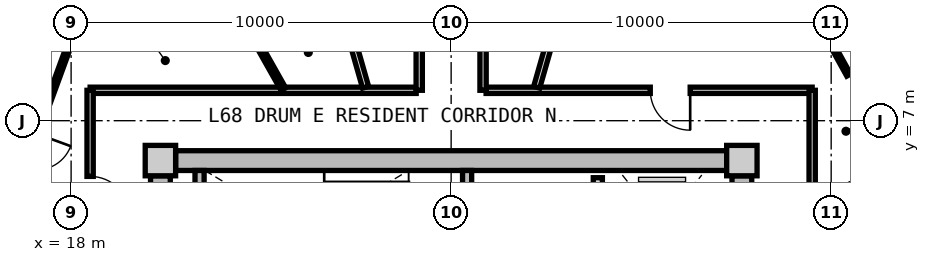
"""IFC4 building model, lengths in metres.
Left out: names, types, materials, properties, quantities, classifications, styles, units other than length and angle.
Written with IfcOpenShell. Run it as: python <this file> out.ifc"""

import sys

from ifc_helpers import new_model, si_unit, direction, frame, frame_2d, origin, origin_2d, place, context, subcontext, project, spatial, rectangle, extrude, source, transform, mapped, element, fill, save


model = new_model("IFC4")
c1 = context("Model", 3, precision=1e-05, world=origin(), true_north=direction((0.0, 1.0)))
c2 = subcontext(c1, "Body", "Model", "MODEL_VIEW")
j1 = project(units=[si_unit("LENGTHUNIT", "METRE"), si_unit("PLANEANGLEUNIT", "RADIAN")], contexts=[c1])
p1 = place(None, origin())
s1 = spatial("IfcSite", under=j1, at=p1, CompositionType="ELEMENT")
p2 = place(p1, origin())
s2 = spatial("IfcBuilding", under=s1, at=p2, CompositionType="ELEMENT")
p3 = place(p2, frame((0.0, 0.0, 220.0)))
s3 = spatial("IfcBuildingStorey", under=s2, at=p3, CompositionType="ELEMENT", Elevation=220.0)
m1 = source(origin(), c2, "Body", "SweptSolid", [
    extrude(rectangle(XDim=0.8, YDim=0.8, at=origin_2d()), origin(), (0.0, 0.0, 1.0), 3.05),
])
for number, where, z_axis, x_axis in (
    (1, (35.65, 5.95, 0.0), (0.0, 0.0, 1.0), (1.0, 0.0, 0.0)),
    (2, (20.35, 5.95, 0.0), (0.0, 0.0, 1.0), (1.0, 0.0, 0.0)),
):
    element("IfcColumn", number, at=place(p3, frame(where, z_axis=z_axis, x_axis=x_axis)), inside=s3, PredefinedType="COLUMN", context=c2, shape_type="MappedRepresentation", body=[
        mapped(m1, transform((0.0, 0.0, 0.0), x_axis=(1.0, 0.0, 0.0), y_axis=(0.0, 1.0, 0.0), z_axis=(0.0, 0.0, 1.0), scale=1.0)),
    ])
m2 = source(origin(), c2, "Body", "SweptSolid", [
    extrude(rectangle(XDim=14.5, YDim=0.52, at=frame_2d((7.25, 0.0))), origin(), (0.0, 0.0, 1.0), 2.76),
])
p4 = place(p3, frame((20.75, 5.95, 0.0), z_axis=(0.0, 0.0, 1.0), x_axis=(1.0, 0.0, 0.0)))
e3 = element("IfcWall", 3, at=p4, inside=s3, PredefinedType="SHEAR", context=c2, shape_type="MappedRepresentation", body=[
    mapped(m2, transform((0.0, 0.0, 0.0), x_axis=(1.0, 0.0, 0.0), y_axis=(0.0, 1.0, 0.0), z_axis=(0.0, 0.0, 1.0), scale=1.0)),
])
m3 = source(origin(), c2, "Body", "SweptSolid", [
    extrude(rectangle(XDim=11.1, YDim=0.52, at=frame_2d((5.55, 0.0))), origin(), (0.0, 0.0, 1.0), 2.76),
])
p5 = place(p3, frame((20.35, -5.55, 0.0), z_axis=(0.0, 0.0, 1.0), x_axis=(0.0, 1.0, 0.0)))
e4 = element("IfcWall", 4, at=p5, inside=s3, PredefinedType="SHEAR", context=c2, shape_type="MappedRepresentation", body=[
    mapped(m3, transform((0.0, 0.0, 0.0), x_axis=(1.0, 0.0, 0.0), y_axis=(0.0, 1.0, 0.0), z_axis=(0.0, 0.0, 1.0), scale=1.0)),
])
p6 = place(p5, frame((3.8, 0.0, 0.0)))
e5 = element("IfcOpeningElement", 5, at=p6, cuts=e4, PredefinedType="OPENING", context=c2, shape_type="SweptSolid", body=[
    extrude(rectangle(XDim=1.2, YDim=2.15, at=frame_2d((0.6, 1.075))), frame((0.0, 0.27, 0.0), z_axis=(0.0, -1.0, 0.0), x_axis=(1.0, 0.0, 0.0)), (0.0, 0.0, 1.0), 0.54),
])
p7 = place(p3, frame((35.65, 5.55, 0.0), z_axis=(0.0, 0.0, 1.0), x_axis=(0.0, -1.0, 0.0)))
e6 = element("IfcWall", 6, at=p7, inside=s3, PredefinedType="SHEAR", context=c2, shape_type="MappedRepresentation", body=[
    mapped(m3, transform((0.0, 0.0, 0.0), x_axis=(1.0, 0.0, 0.0), y_axis=(0.0, 1.0, 0.0), z_axis=(0.0, 0.0, 1.0), scale=1.0)),
])
p8 = place(p7, frame((5.65, 0.0, 0.0)))
e7 = element("IfcOpeningElement", 7, at=p8, cuts=e6, PredefinedType="OPENING", context=c2, shape_type="SweptSolid", body=[
    extrude(rectangle(XDim=1.2, YDim=2.15, at=frame_2d((0.6, 1.075))), frame((0.0, 0.27, 0.0), z_axis=(0.0, -1.0, 0.0), x_axis=(1.0, 0.0, 0.0)), (0.0, 0.0, 1.0), 0.54),
])
m4 = source(origin(), c2, "Body", "SweptSolid", [
    extrude(rectangle(XDim=3.24, YDim=0.24, at=frame_2d((1.62, 0.0))), origin(), (0.0, 0.0, 1.0), 2.76),
])
p9 = place(p3, frame((21.38, 2.45, 0.0), z_axis=(0.0, 0.0, 1.0), x_axis=(0.0, 1.0, 0.0)))
e8 = element("IfcWall", 8, at=p9, inside=s3, PredefinedType="PARTITIONING", context=c2, shape_type="MappedRepresentation", body=[
    mapped(m4, transform((0.0, 0.0, 0.0), x_axis=(1.0, 0.0, 0.0), y_axis=(0.0, 1.0, 0.0), z_axis=(0.0, 0.0, 1.0), scale=1.0)),
])
p10 = place(p3, frame((28.42, 2.45, 0.0), z_axis=(0.0, 0.0, 1.0), x_axis=(0.0, 1.0, 0.0)))
e9 = element("IfcWall", 9, at=p10, inside=s3, PredefinedType="PARTITIONING", context=c2, shape_type="MappedRepresentation", body=[
    mapped(m4, transform((0.0, 0.0, 0.0), x_axis=(1.0, 0.0, 0.0), y_axis=(0.0, 1.0, 0.0), z_axis=(0.0, 0.0, 1.0), scale=1.0)),
])
p11 = place(p10, frame((0.55, 0.0, 0.0)))
e10 = element("IfcOpeningElement", 10, at=p11, cuts=e9, PredefinedType="OPENING", context=c2, shape_type="SweptSolid", body=[
    extrude(rectangle(XDim=1.1, YDim=2.15, at=frame_2d((0.55, 1.075))), frame((0.0, 0.13, 0.0), z_axis=(0.0, -1.0, 0.0), x_axis=(1.0, 0.0, 0.0)), (0.0, 0.0, 1.0), 0.26),
])
m5 = source(origin(), c2, "Body", "SweptSolid", [
    extrude(rectangle(XDim=5.0, YDim=0.24, at=frame_2d((2.5, 0.0))), origin(), (0.0, 0.0, 1.0), 2.745),
])
p12 = place(p3, frame((31.86, 0.5, 0.0), z_axis=(0.0, 0.0, 1.0), x_axis=(0.0, 1.0, 0.0)))
e11 = element("IfcWall", 11, at=p12, inside=s3, PredefinedType="PARTITIONING", context=c2, shape_type="MappedRepresentation", body=[
    mapped(m5, transform((0.0, 0.0, 0.0), x_axis=(1.0, 0.0, 0.0), y_axis=(0.0, 1.0, 0.0), z_axis=(0.0, 0.0, 1.0), scale=1.0)),
])
p13 = place(p12, frame((3.05, 0.0, 0.0)))
e12 = element("IfcOpeningElement", 12, at=p13, cuts=e11, PredefinedType="OPENING", context=c2, shape_type="SweptSolid", body=[
    extrude(rectangle(XDim=1.3, YDim=2.2, at=frame_2d((0.65, 1.1))), frame((0.0, 0.13, 0.0), z_axis=(0.0, -1.0, 0.0), x_axis=(1.0, 0.0, 0.0)), (0.0, 0.0, 1.0), 0.26),
])
p14 = place(p12, frame((0.55, 0.0, 0.0)))
e13 = element("IfcOpeningElement", 13, at=p14, cuts=e11, PredefinedType="OPENING", context=c2, shape_type="SweptSolid", body=[
    extrude(rectangle(XDim=1.3, YDim=2.2, at=frame_2d((0.65, 1.1))), frame((0.0, 0.13, 0.0), z_axis=(0.0, -1.0, 0.0), x_axis=(1.0, 0.0, 0.0)), (0.0, 0.0, 1.0), 0.26),
])
m6 = source(origin(), c2, "Body", "SweptSolid", [
    extrude(rectangle(XDim=8.58, YDim=0.165, at=frame_2d((4.29, 0.0))), origin(), (0.0, 0.0, 1.0), 2.745),
])
p15 = place(p3, frame((18.5, 7.8, 0.0), z_axis=(0.0, 0.0, 1.0), x_axis=(1.0, 0.0, 0.0)))
e14 = element("IfcWall", 14, at=p15, inside=s3, PredefinedType="PARTITIONING", context=c2, shape_type="MappedRepresentation", body=[
    mapped(m6, transform((0.0, 0.0, 0.0), x_axis=(1.0, 0.0, 0.0), y_axis=(0.0, 1.0, 0.0), z_axis=(0.0, 0.0, 1.0), scale=1.0)),
])
p16 = place(p3, frame((28.92, 7.8, 0.0), z_axis=(0.0, 0.0, 1.0), x_axis=(1.0, 0.0, 0.0)))
e15 = element("IfcWall", 15, at=p16, inside=s3, PredefinedType="PARTITIONING", context=c2, shape_type="MappedRepresentation", body=[
    mapped(m6, transform((0.0, 0.0, 0.0), x_axis=(1.0, 0.0, 0.0), y_axis=(0.0, 1.0, 0.0), z_axis=(0.0, 0.0, 1.0), scale=1.0)),
])
p17 = place(p16, frame((4.32, 0.0, 0.0)))
e16 = element("IfcOpeningElement", 16, at=p17, cuts=e15, PredefinedType="OPENING", context=c2, shape_type="SweptSolid", body=[
    extrude(rectangle(XDim=1.05, YDim=2.15, at=frame_2d((0.525, 1.075))), frame((0.0, 0.093, 0.0), z_axis=(0.0, -1.0, 0.0), x_axis=(1.0, 0.0, 0.0)), (0.0, 0.0, 1.0), 0.185),
])
m7 = source(origin(), c2, "Body", "SweptSolid", [
    extrude(rectangle(XDim=6.88, YDim=0.165, at=frame_2d((3.44, 0.0))), origin(), (0.0, 0.0, 1.0), 2.745),
])
p18 = place(p3, frame((18.5, 0.92, 0.0), z_axis=(0.0, 0.0, 1.0), x_axis=(0.0, 1.0, 0.0)))
e17 = element("IfcWall", 17, at=p18, inside=s3, PredefinedType="PARTITIONING", context=c2, shape_type="MappedRepresentation", body=[
    mapped(m7, transform((0.0, 0.0, 0.0), x_axis=(1.0, 0.0, 0.0), y_axis=(0.0, 1.0, 0.0), z_axis=(0.0, 0.0, 1.0), scale=1.0)),
])
p19 = place(p18, frame((3.564, 0.0, 0.0)))
e18 = element("IfcOpeningElement", 18, at=p19, cuts=e17, PredefinedType="OPENING", context=c2, shape_type="SweptSolid", body=[
    extrude(rectangle(XDim=1.05, YDim=2.15, at=frame_2d((0.525, 1.075))), frame((0.0, 0.093, 0.0), z_axis=(0.0, -1.0, 0.0), x_axis=(1.0, 0.0, 0.0)), (0.0, 0.0, 1.0), 0.185),
])
p20 = place(p3, frame((37.5, 7.8, 0.0), z_axis=(0.0, 0.0, 1.0), x_axis=(0.0, -1.0, 0.0)))
e19 = element("IfcWall", 19, at=p20, inside=s3, PredefinedType="PARTITIONING", context=c2, shape_type="MappedRepresentation", body=[
    mapped(m7, transform((0.0, 0.0, 0.0), x_axis=(1.0, 0.0, 0.0), y_axis=(0.0, 1.0, 0.0), z_axis=(0.0, 0.0, 1.0), scale=1.0)),
])
m8 = source(origin(), c2, "Body", "SweptSolid", [
    extrude(rectangle(XDim=6.974, YDim=0.165, at=frame_2d((3.487, 0.0))), origin(), (0.0, 0.0, 1.0), 2.345),
])
for number, where, z_axis, x_axis in (
    (20, (30.251, 7.88, 0.0), (0.0, 0.0, 1.0), (0.275, 0.962, 0.0)),
    (21, (25.749, 7.88, 0.0), (0.0, 0.0, 1.0), (-0.275, 0.962, 0.0)),
):
    element("IfcWall", number, at=place(p3, frame(where, z_axis=z_axis, x_axis=x_axis)), inside=s3, PredefinedType="PARTITIONING", context=c2, shape_type="MappedRepresentation", body=[
        mapped(m8, transform((0.0, 0.0, 0.0), x_axis=(1.0, 0.0, 0.0), y_axis=(0.0, 1.0, 0.0), z_axis=(0.0, 0.0, 1.0), scale=1.0)),
    ])
m9 = source(origin(), c2, "Body", "SweptSolid", [
    extrude(rectangle(XDim=6.835, YDim=0.165, at=frame_2d((3.418, 0.0))), origin(), (0.0, 0.0, 1.0), 2.745),
])
p21 = place(p3, frame((27.16, 7.8, 0.0), z_axis=(0.0, 0.0, 1.0), x_axis=(0.0, 1.0, 0.0)))
e22 = element("IfcWall", 22, at=p21, inside=s3, PredefinedType="PARTITIONING", context=c2, shape_type="MappedRepresentation", body=[
    mapped(m9, transform((0.0, 0.0, 0.0), x_axis=(1.0, 0.0, 0.0), y_axis=(0.0, 1.0, 0.0), z_axis=(0.0, 0.0, 1.0), scale=1.0)),
])
p22 = place(p21, frame((2.943, 0.0, 0.0)))
e23 = element("IfcOpeningElement", 23, at=p22, cuts=e22, PredefinedType="OPENING", context=c2, shape_type="SweptSolid", body=[
    extrude(rectangle(XDim=0.95, YDim=2.1, at=frame_2d((0.475, 1.05))), frame((0.0, 0.093, 0.0), z_axis=(0.0, -1.0, 0.0), x_axis=(1.0, 0.0, 0.0)), (0.0, 0.0, 1.0), 0.185),
])
p23 = place(p3, frame((28.84, 14.635, 0.0), z_axis=(0.0, 0.0, 1.0), x_axis=(0.0, -1.0, 0.0)))
e24 = element("IfcWall", 24, at=p23, inside=s3, PredefinedType="PARTITIONING", context=c2, shape_type="MappedRepresentation", body=[
    mapped(m9, transform((0.0, 0.0, 0.0), x_axis=(1.0, 0.0, 0.0), y_axis=(0.0, 1.0, 0.0), z_axis=(0.0, 0.0, 1.0), scale=1.0)),
])
p24 = place(p23, frame((2.943, 0.0, 0.0)))
e25 = element("IfcOpeningElement", 25, at=p24, cuts=e24, PredefinedType="OPENING", context=c2, shape_type="SweptSolid", body=[
    extrude(rectangle(XDim=0.95, YDim=2.1, at=frame_2d((0.475, 1.05))), frame((0.0, 0.093, 0.0), z_axis=(0.0, -1.0, 0.0), x_axis=(1.0, 0.0, 0.0)), (0.0, 0.0, 1.0), 0.185),
])
m10 = source(origin(), c2, "Body", "SweptSolid", [
    extrude(rectangle(XDim=1.638, YDim=0.14, at=frame_2d((0.819, 0.0))), origin(), (0.0, 0.0, 1.0), 2.745),
])
p25 = place(p3, frame((37.53, 4.778, 0.0), z_axis=(0.0, 0.0, 1.0), x_axis=(0.893919977945, 0.448226586707, 0.0)))
e26 = element("IfcWall", 26, at=p25, inside=s3, PredefinedType="PARTITIONING", context=c2, shape_type="MappedRepresentation", body=[
    mapped(m10, transform((0.0, 0.0, 0.0), x_axis=(1.0, 0.0, 0.0), y_axis=(0.0, 1.0, 0.0), z_axis=(0.0, 0.0, 1.0), scale=1.0)),
])
m11 = source(origin(), c2, "Body", "SweptSolid", [
    extrude(rectangle(XDim=3.45, YDim=0.115, at=frame_2d((1.725, 0.0))), origin(), (0.0, 0.0, 1.0), 2.745),
])
p26 = place(p3, frame((39.525, 6.275, 0.0), z_axis=(0.0, 0.0, 1.0), x_axis=(-0.483659007882, 0.875256513312, 0.0)))
e27 = element("IfcWall", 27, at=p26, inside=s3, PredefinedType="PARTITIONING", context=c2, shape_type="MappedRepresentation", body=[
    mapped(m11, transform((0.0, 0.0, 0.0), x_axis=(1.0, 0.0, 0.0), y_axis=(0.0, 1.0, 0.0), z_axis=(0.0, 0.0, 1.0), scale=1.0)),
])
p27 = place(p26, frame((1.25, 0.0, 0.0)))
e28 = element("IfcOpeningElement", 28, at=p27, cuts=e27, PredefinedType="OPENING", context=c2, shape_type="SweptSolid", body=[
    extrude(rectangle(XDim=0.95, YDim=2.1, at=frame_2d((0.475, 1.05))), frame((0.0, 0.067, 0.0), z_axis=(0.0, -1.0, 0.0), x_axis=(1.0, 0.0, 0.0)), (0.0, 0.0, 1.0), 0.135),
])
m12 = source(origin(), c2, "Body", "SweptSolid", [
    extrude(rectangle(XDim=6.69, YDim=0.115, at=frame_2d((3.345, 0.0))), origin(), (0.0, 0.0, 1.0), 2.745),
])
p28 = place(p3, frame((18.083, 9.352, 0.0), z_axis=(0.0, 0.0, 1.0), x_axis=(-0.343693784919, -0.939081776102, 0.0)))
e29 = element("IfcWall", 29, at=p28, inside=s3, PredefinedType="PARTITIONING", context=c2, shape_type="MappedRepresentation", body=[
    mapped(m12, transform((0.0, 0.0, 0.0), x_axis=(1.0, 0.0, 0.0), y_axis=(0.0, 1.0, 0.0), z_axis=(0.0, 0.0, 1.0), scale=1.0)),
])
p29 = place(p28, frame((2.87, 0.0, 0.0)))
e30 = element("IfcOpeningElement", 30, at=p29, cuts=e29, PredefinedType="OPENING", context=c2, shape_type="SweptSolid", body=[
    extrude(rectangle(XDim=0.95, YDim=2.1, at=frame_2d((0.475, 1.05))), frame((0.0, 0.067, 0.0), z_axis=(0.0, -1.0, 0.0), x_axis=(1.0, 0.0, 0.0)), (0.0, 0.0, 1.0), 0.135),
])
m13 = source(origin(), c2, "Body", "SweptSolid", [
    extrude(rectangle(XDim=2.035, YDim=0.14, at=frame_2d((1.018, 0.0))), origin(), (0.0, 0.0, 1.0), 2.745),
])
p30 = place(p3, frame((23.585, 7.83, 0.0), z_axis=(0.0, 0.0, 1.0), x_axis=(-0.491092509169, 0.871107425888, 0.0)))
e31 = element("IfcWall", 31, at=p30, inside=s3, PredefinedType="PARTITIONING", context=c2, shape_type="MappedRepresentation", body=[
    mapped(m13, transform((0.0, 0.0, 0.0), x_axis=(1.0, 0.0, 0.0), y_axis=(0.0, 1.0, 0.0), z_axis=(0.0, 0.0, 1.0), scale=1.0)),
])
m14 = source(origin(), c2, "Body", "SweptSolid", [
    extrude(rectangle(XDim=1.05, YDim=2.15, at=frame_2d((0.525, 1.075))), frame((0.0, 0.025, 0.0), z_axis=(0.0, -1.0, 0.0), x_axis=(1.0, 0.0, 0.0)), (0.0, 0.0, 1.0), 0.05),
])
p31 = place(p17, frame((1.05, 0.0, 0.0), z_axis=(0.0, 0.0, 1.0), x_axis=(-1.0, 0.0, 0.0)))
e32 = element("IfcDoor", 32, at=p31, inside=s3, OperationType="SINGLE_SWING_LEFT", PredefinedType="DOOR", context=c2, shape_type="MappedRepresentation", body=[
    mapped(m14, transform((0.0, 0.0, 0.0), x_axis=(1.0, 0.0, 0.0), y_axis=(0.0, 1.0, 0.0), z_axis=(0.0, 0.0, 1.0), scale=1.0)),
])
fill(e16, e32)
m15 = source(origin(), c2, "Body", "SweptSolid", [
    extrude(rectangle(XDim=0.95, YDim=2.1, at=frame_2d((0.475, 1.05))), frame((0.0, 0.025, 0.0), z_axis=(0.0, -1.0, 0.0), x_axis=(1.0, 0.0, 0.0)), (0.0, 0.0, 1.0), 0.05),
])
p32 = place(p27, frame((0.95, 0.0, 0.0), z_axis=(0.0, 0.0, 1.0), x_axis=(-1.0, 0.0, 0.0)))
e33 = element("IfcDoor", 33, at=p32, inside=s3, OperationType="SINGLE_SWING_LEFT", PredefinedType="DOOR", context=c2, shape_type="MappedRepresentation", body=[
    mapped(m15, transform((0.0, 0.0, 0.0), x_axis=(1.0, 0.0, 0.0), y_axis=(0.0, 1.0, 0.0), z_axis=(0.0, 0.0, 1.0), scale=1.0)),
])
fill(e28, e33)
p33 = place(p19, frame((1.05, 0.0, 0.0), z_axis=(0.0, 0.0, 1.0), x_axis=(-1.0, 0.0, 0.0)))
e34 = element("IfcDoor", 34, at=p33, inside=s3, OperationType="SINGLE_SWING_RIGHT", PredefinedType="DOOR", context=c2, shape_type="MappedRepresentation", body=[
    mapped(m14, transform((0.0, 0.0, 0.0), x_axis=(1.0, 0.0, 0.0), y_axis=(0.0, 1.0, 0.0), z_axis=(0.0, 0.0, 1.0), scale=1.0)),
])
fill(e18, e34)
save(model, sys.argv[1])
